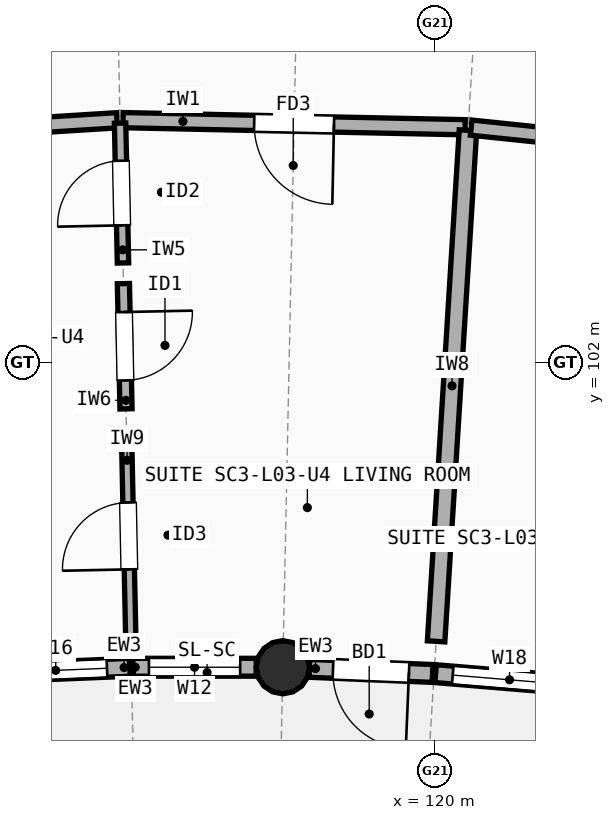
"""IFC4 building model, lengths in metres.
Left out: names, types, materials, properties, quantities, classifications, styles, units other than length and angle.
Written with IfcOpenShell. Run it as: python <this file> out.ifc"""

import sys

from ifc_helpers import new_model, si_unit, direction, frame, frame_2d, origin, origin_2d, place, context, subcontext, project, spatial, rectangle, circle, extrude, element, fill, save


model = new_model("IFC4")
c1 = context("Model", 3, precision=1e-05, world=origin(), true_north=direction((0.0, 1.0)))
c2 = subcontext(c1, "Body", "Model", "MODEL_VIEW")
j1 = project(units=[si_unit("LENGTHUNIT", "METRE"), si_unit("PLANEANGLEUNIT", "RADIAN")], contexts=[c1])
p1 = place(None, origin())
s1 = spatial("IfcSite", under=j1, at=p1, CompositionType="ELEMENT")
p2 = place(p1, origin())
s2 = spatial("IfcBuilding", under=s1, at=p2, CompositionType="ELEMENT")
p3 = place(p2, frame((0.0, 0.0, 10.9)))
s3 = spatial("IfcBuildingStorey", under=s2, at=p3, CompositionType="ELEMENT", Elevation=10.9)
p4 = place(p3, frame((117.996, 97.99, 0.0), z_axis=(0.0, 0.0, 1.0), x_axis=(1.0, 0.0, 0.0)))
e1 = element("IfcColumn", 1, at=p4, inside=s3, PredefinedType="COLUMN", context=c2, shape_type="SweptSolid", body=[
    extrude(circle(Radius=0.35, at=origin_2d()), origin(), (0.0, 0.0, 1.0), 2.948),
])
p5 = place(p3, frame((114.033, 97.908, 0.0), z_axis=(0.0, 0.0, 1.0), x_axis=(0.999132639597, 0.041640947307, 0.0)))
e2 = element("IfcWall", 2, at=p5, inside=s3, PredefinedType="STANDARD", context=c2, shape_type="SweptSolid", body=[
    extrude(rectangle(XDim=1.952, YDim=0.235, at=frame_2d((0.976, 0.0))), origin(), (0.0, 0.0, 1.0), 2.684),
])
p6 = place(p5, frame((0.301, 0.0, 0.85)))
e3 = element("IfcOpeningElement", 3, at=p6, cuts=e2, PredefinedType="OPENING", context=c2, shape_type="SweptSolid", body=[
    extrude(rectangle(XDim=1.35, YDim=1.5, at=frame_2d((0.675, 0.75))), frame((0.0, 0.127, 0.0), z_axis=(0.0, -1.0, 0.0), x_axis=(1.0, 0.0, 0.0)), (0.0, 0.0, 1.0), 0.255),
])
p7 = place(p3, frame((116.024, 97.99, 0.0), z_axis=(0.0, 0.0, 1.0), x_axis=(1.0, 0.0, 0.0)))
e4 = element("IfcWall", 4, at=p7, inside=s3, PredefinedType="STANDARD", context=c2, shape_type="SweptSolid", body=[
    extrude(rectangle(XDim=1.623, YDim=0.235, at=frame_2d((0.811, 0.0))), origin(), (0.0, 0.0, 1.0), 2.684),
])
p8 = place(p7, frame((0.211, 0.0, 0.85)))
e5 = element("IfcOpeningElement", 5, at=p8, cuts=e4, PredefinedType="OPENING", context=c2, shape_type="SweptSolid", body=[
    extrude(rectangle(XDim=1.2, YDim=1.35, at=frame_2d((0.6, 0.675))), frame((0.0, 0.127, 0.0), z_axis=(0.0, -1.0, 0.0), x_axis=(1.0, 0.0, 0.0)), (0.0, 0.0, 1.0), 0.255),
])
p9 = place(p3, frame((118.346, 97.975, 0.0), z_axis=(0.0, 0.0, 1.0), x_axis=(0.999136981031, -0.041536648104, 0.0)))
e6 = element("IfcWall", 6, at=p9, inside=s3, PredefinedType="STANDARD", context=c2, shape_type="SweptSolid", body=[
    extrude(rectangle(XDim=1.622, YDim=0.235, at=frame_2d((0.811, 0.0))), origin(), (0.0, 0.0, 1.0), 2.684),
])
p10 = place(p9, frame((0.311, 0.0, 0.0)))
e7 = element("IfcOpeningElement", 7, at=p10, cuts=e6, PredefinedType="OPENING", context=c2, shape_type="SweptSolid", body=[
    extrude(rectangle(XDim=1.0, YDim=2.15, at=frame_2d((0.5, 1.075))), frame((0.0, 0.127, 0.0), z_axis=(0.0, -1.0, 0.0), x_axis=(1.0, 0.0, 0.0)), (0.0, 0.0, 1.0), 0.255),
])
p11 = place(p3, frame((120.007, 97.905, 0.0), z_axis=(0.0, 0.0, 1.0), x_axis=(0.996557820409, -0.082900606641, 0.0)))
e8 = element("IfcWall", 8, at=p11, inside=s3, PredefinedType="STANDARD", context=c2, shape_type="SweptSolid", body=[
    extrude(rectangle(XDim=1.953, YDim=0.235, at=frame_2d((0.976, 0.0))), origin(), (0.0, 0.0, 1.0), 2.684),
])
p12 = place(p11, frame((0.226, 0.0, 0.85)))
e9 = element("IfcOpeningElement", 9, at=p12, cuts=e8, PredefinedType="OPENING", context=c2, shape_type="SweptSolid", body=[
    extrude(rectangle(XDim=1.5, YDim=1.4, at=frame_2d((0.75, 0.7))), frame((0.0, 0.127, 0.0), z_axis=(0.0, -1.0, 0.0), x_axis=(1.0, 0.0, 0.0)), (0.0, 0.0, 1.0), 0.255),
])
p13 = place(p3, frame((111.322, 104.906, 0.0), z_axis=(0.0, 0.0, 1.0), x_axis=(0.998063116084, 0.062209455176, 0.0)))
e10 = element("IfcWall", 10, at=p13, inside=s3, PredefinedType="SOLIDWALL", context=c2, shape_type="SweptSolid", body=[
    extrude(rectangle(XDim=4.501, YDim=0.2, at=frame_2d((2.251, 0.0))), origin(), (0.0, 0.0, 1.0), 2.722),
])
p14 = place(p3, frame((115.894, 105.187, 0.0), z_axis=(0.0, 0.0, 1.0), x_axis=(0.999785356511, -0.020718129879, 0.0)))
e11 = element("IfcWall", 11, at=p14, inside=s3, PredefinedType="SOLIDWALL", context=c2, shape_type="SweptSolid", body=[
    extrude(rectangle(XDim=4.501, YDim=0.2, at=frame_2d((2.251, 0.0))), origin(), (0.0, 0.0, 1.0), 2.762),
])
p15 = place(p14, frame((1.726, 0.0, 0.0)))
e12 = element("IfcOpeningElement", 12, at=p15, cuts=e11, PredefinedType="OPENING", context=c2, shape_type="SweptSolid", body=[
    extrude(rectangle(XDim=1.05, YDim=2.15, at=frame_2d((0.525, 1.075))), frame((0.0, 0.11, 0.0), z_axis=(0.0, -1.0, 0.0), x_axis=(1.0, 0.0, 0.0)), (0.0, 0.0, 1.0), 0.22),
])
p16 = place(p3, frame((115.997, 98.318, 0.0), z_axis=(0.0, 0.0, 1.0), x_axis=(-0.02075255058, 0.999784642633, 0.0)))
e13 = element("IfcWall", 13, at=p16, inside=s3, PredefinedType="PARTITIONING", context=c2, shape_type="SweptSolid", body=[
    extrude(rectangle(XDim=2.8, YDim=0.135, at=frame_2d((1.4, 0.0))), origin(), (0.0, 0.0, 1.0), 2.742),
])
p17 = place(p16, frame((0.96, 0.0, 0.0)))
e14 = element("IfcOpeningElement", 14, at=p17, cuts=e13, PredefinedType="OPENING", context=c2, shape_type="SweptSolid", body=[
    extrude(rectangle(XDim=0.88, YDim=2.1, at=frame_2d((0.44, 1.05))), frame((0.0, 0.077, 0.0), z_axis=(0.0, -1.0, 0.0), x_axis=(1.0, 0.0, 0.0)), (0.0, 0.0, 1.0), 0.155),
])
p18 = place(p3, frame((115.933, 101.389, 0.0), z_axis=(0.0, 0.0, 1.0), x_axis=(-0.020887426075, 0.999781833918, 0.0)))
e15 = element("IfcWall", 15, at=p18, inside=s3, PredefinedType="PLUMBINGWALL", context=c2, shape_type="SweptSolid", body=[
    extrude(rectangle(XDim=1.648, YDim=0.16, at=frame_2d((0.824, 0.0))), origin(), (0.0, 0.0, 1.0), 2.742),
])
p19 = place(p18, frame((0.374, 0.0, 0.0)))
e16 = element("IfcOpeningElement", 16, at=p19, cuts=e15, PredefinedType="OPENING", context=c2, shape_type="SweptSolid", body=[
    extrude(rectangle(XDim=0.9, YDim=2.1, at=frame_2d((0.45, 1.05))), frame((0.0, 0.09, 0.0), z_axis=(0.0, -1.0, 0.0), x_axis=(1.0, 0.0, 0.0)), (0.0, 0.0, 1.0), 0.18),
])
p20 = place(p3, frame((115.893, 103.309, 0.0), z_axis=(0.0, 0.0, 1.0), x_axis=(-0.020698948586, 0.999785753813, 0.0)))
e17 = element("IfcWall", 17, at=p20, inside=s3, PredefinedType="PARTITIONING", context=c2, shape_type="SweptSolid", body=[
    extrude(rectangle(XDim=1.84, YDim=0.15, at=frame_2d((0.92, 0.0))), origin(), (0.0, 0.0, 1.0), 2.742),
])
p21 = place(p20, frame((0.495, 0.0, 0.0)))
e18 = element("IfcOpeningElement", 18, at=p21, cuts=e17, PredefinedType="OPENING", context=c2, shape_type="SweptSolid", body=[
    extrude(rectangle(XDim=0.85, YDim=2.1, at=frame_2d((0.425, 1.05))), frame((0.0, 0.085, 0.0), z_axis=(0.0, -1.0, 0.0), x_axis=(1.0, 0.0, 0.0)), (0.0, 0.0, 1.0), 0.17),
])
p22 = place(p3, frame((120.013, 98.33, 0.0), z_axis=(0.0, 0.0, 1.0), x_axis=(0.062229364488, 0.998061874933, 0.0)))
e19 = element("IfcWall", 19, at=p22, inside=s3, PredefinedType="SOLIDWALL", context=c2, shape_type="SweptSolid", body=[
    extrude(rectangle(XDim=6.736, YDim=0.23, at=frame_2d((3.368, 0.0))), origin(), (0.0, 0.0, 1.0), 2.722),
])
p23 = place(p3, frame((120.475, 105.089, 0.0), z_axis=(0.0, 0.0, 1.0), x_axis=(0.994614565886, -0.103642970468, 0.0)))
e20 = element("IfcWall", 20, at=p23, inside=s3, PredefinedType="SOLIDWALL", context=c2, shape_type="SweptSolid", body=[
    extrude(rectangle(XDim=4.501, YDim=0.2, at=frame_2d((2.251, 0.0))), origin(), (0.0, 0.0, 1.0), 2.742),
])
p24 = place(p6, origin())
e21 = element("IfcWindow", 21, at=p24, inside=s3, PartitioningType="SINGLE_PANEL", PredefinedType="WINDOW", context=c2, shape_type="SweptSolid", body=[
    extrude(rectangle(XDim=1.35, YDim=1.5, at=frame_2d((0.675, 0.75))), frame((0.0, 0.03, 0.0), z_axis=(0.0, -1.0, 0.0), x_axis=(1.0, 0.0, 0.0)), (0.0, 0.0, 1.0), 0.06),
])
fill(e3, e21)
p25 = place(p8, origin())
e22 = element("IfcWindow", 22, at=p25, inside=s3, PartitioningType="SINGLE_PANEL", PredefinedType="WINDOW", context=c2, shape_type="SweptSolid", body=[
    extrude(rectangle(XDim=1.2, YDim=1.35, at=frame_2d((0.6, 0.675))), frame((0.0, 0.03, 0.0), z_axis=(0.0, -1.0, 0.0), x_axis=(1.0, 0.0, 0.0)), (0.0, 0.0, 1.0), 0.06),
])
fill(e5, e22)
p26 = place(p10, frame((1.0, 0.0, 0.0), z_axis=(0.0, 0.0, 1.0), x_axis=(-1.0, 0.0, 0.0)))
e23 = element("IfcDoor", 23, at=p26, inside=s3, OperationType="SINGLE_SWING_RIGHT", PredefinedType="DOOR", context=c2, shape_type="SweptSolid", body=[
    extrude(rectangle(XDim=1.0, YDim=2.15, at=frame_2d((0.5, 1.075))), frame((0.0, 0.025, 0.0), z_axis=(0.0, -1.0, 0.0), x_axis=(1.0, 0.0, 0.0)), (0.0, 0.0, 1.0), 0.05),
])
fill(e7, e23)
p27 = place(p12, origin())
e24 = element("IfcWindow", 24, at=p27, inside=s3, PartitioningType="SINGLE_PANEL", PredefinedType="WINDOW", context=c2, shape_type="SweptSolid", body=[
    extrude(rectangle(XDim=1.5, YDim=1.4, at=frame_2d((0.75, 0.7))), frame((0.0, 0.03, 0.0), z_axis=(0.0, -1.0, 0.0), x_axis=(1.0, 0.0, 0.0)), (0.0, 0.0, 1.0), 0.06),
])
fill(e9, e24)
p28 = place(p15, origin())
e25 = element("IfcDoor", 25, at=p28, inside=s3, OperationType="SINGLE_SWING_RIGHT", PredefinedType="DOOR", context=c2, shape_type="SweptSolid", body=[
    extrude(rectangle(XDim=1.05, YDim=2.15, at=frame_2d((0.525, 1.075))), frame((0.0, 0.025, 0.0), z_axis=(0.0, -1.0, 0.0), x_axis=(1.0, 0.0, 0.0)), (0.0, 0.0, 1.0), 0.05),
])
fill(e12, e25)
p29 = place(p17, origin())
e26 = element("IfcDoor", 26, at=p29, inside=s3, OperationType="SINGLE_SWING_LEFT", PredefinedType="DOOR", context=c2, shape_type="SweptSolid", body=[
    extrude(rectangle(XDim=0.88, YDim=2.1, at=frame_2d((0.44, 1.05))), frame((0.0, 0.025, 0.0), z_axis=(0.0, -1.0, 0.0), x_axis=(1.0, 0.0, 0.0)), (0.0, 0.0, 1.0), 0.05),
])
fill(e14, e26)
p30 = place(p19, origin())
e27 = element("IfcDoor", 27, at=p30, inside=s3, OperationType="SINGLE_SWING_RIGHT", PredefinedType="DOOR", context=c2, shape_type="SweptSolid", body=[
    extrude(rectangle(XDim=0.9, YDim=2.1, at=frame_2d((0.45, 1.05))), frame((0.0, 0.025, 0.0), z_axis=(0.0, -1.0, 0.0), x_axis=(1.0, 0.0, 0.0)), (0.0, 0.0, 1.0), 0.05),
])
fill(e16, e27)
p31 = place(p21, origin())
e28 = element("IfcDoor", 28, at=p31, inside=s3, OperationType="SINGLE_SWING_LEFT", PredefinedType="DOOR", context=c2, shape_type="SweptSolid", body=[
    extrude(rectangle(XDim=0.85, YDim=2.1, at=frame_2d((0.425, 1.05))), frame((0.0, 0.025, 0.0), z_axis=(0.0, -1.0, 0.0), x_axis=(1.0, 0.0, 0.0)), (0.0, 0.0, 1.0), 0.05),
])
fill(e18, e28)
save(model, sys.argv[1])
